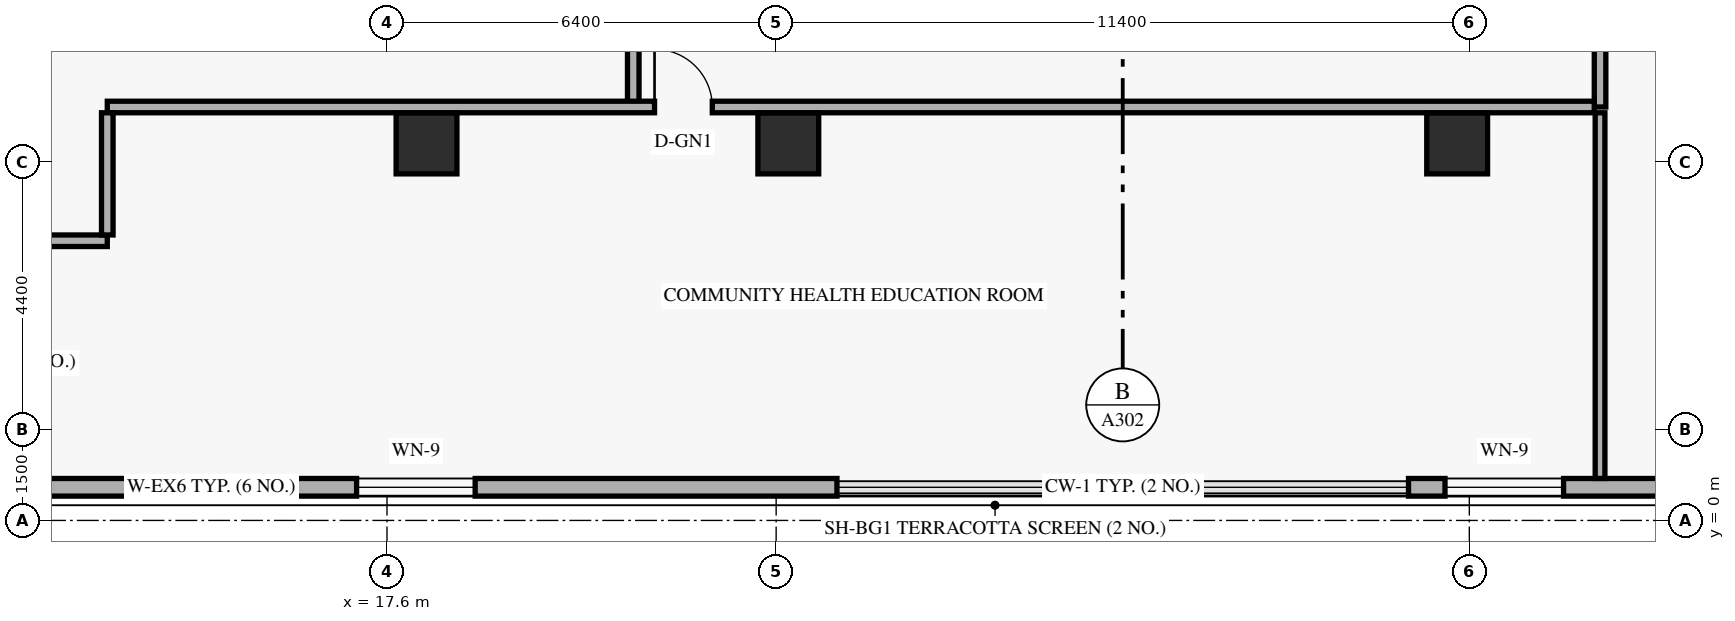
"""IFC4 building model, lengths in metres.
Left out: names, types, materials, properties, quantities, classifications, styles, units other than length and angle.
Written with IfcOpenShell. Run it as: python <this file> out.ifc"""

import sys

from ifc_helpers import new_model, si_unit, direction, frame, frame_2d, origin, origin_2d, place, context, subcontext, project, spatial, rectangle, extrude, element, fill, save


model = new_model("IFC4")
c1 = context("Model", 3, precision=1e-05, world=origin(), true_north=direction((0.0, 1.0)))
c2 = subcontext(c1, "Body", "Model", "MODEL_VIEW")
j1 = project(units=[si_unit("LENGTHUNIT", "METRE"), si_unit("PLANEANGLEUNIT", "RADIAN")], contexts=[c1])
p1 = place(None, origin())
s1 = spatial("IfcSite", under=j1, at=p1, CompositionType="ELEMENT")
p2 = place(p1, origin())
s2 = spatial("IfcBuilding", under=s1, at=p2, CompositionType="ELEMENT")
p3 = place(p2, frame((0.0, 0.0, 4.8)))
s3 = spatial("IfcBuildingStorey", under=s2, at=p3, CompositionType="ELEMENT", Elevation=4.8)
for number, where, z_axis, x_axis in (
    (1, (18.25, 6.2, 0.0), (0.0, 0.0, 1.0), (1.0, 0.0, 0.0)),
    (2, (24.2, 6.2, 0.0), (0.0, 0.0, 1.0), (1.0, 0.0, 0.0)),
    (3, (35.2, 6.2, 0.0), (0.0, 0.0, 1.0), (1.0, 0.0, 0.0)),
):
    element("IfcColumn", number, at=place(p3, frame(where, z_axis=z_axis, x_axis=x_axis)), inside=s3, PredefinedType="COLUMN", context=c2, shape_type="SweptSolid", body=[
        extrude(rectangle(XDim=1.0, YDim=1.0, at=origin_2d()), origin(), (0.0, 0.0, 1.0), 4.8),
    ])
p4 = place(p3, frame((4.42, 0.545, 0.0), z_axis=(0.0, 0.0, 1.0), x_axis=(1.0, 0.0, 0.0)))
e4 = element("IfcWall", 4, at=p4, inside=s3, PredefinedType="SOLIDWALL", context=c2, shape_type="SweptSolid", body=[
    extrude(rectangle(XDim=20.58, YDim=0.29, at=frame_2d((10.29, 0.0))), origin(), (0.0, 0.0, 1.0), 4.52),
])
p5 = place(p4, frame((2.39, 0.0, 0.85)))
e5 = element("IfcOpeningElement", 5, at=p5, cuts=e4, PredefinedType="OPENING", context=c2, shape_type="SweptSolid", body=[
    extrude(rectangle(XDim=1.95, YDim=1.75, at=frame_2d((0.975, 0.875))), frame((0.0, 0.155, 0.0), z_axis=(0.0, -1.0, 0.0), x_axis=(1.0, 0.0, 0.0)), (0.0, 0.0, 1.0), 0.31),
])
p6 = place(p4, frame((12.68, 0.0, 0.85)))
e6 = element("IfcOpeningElement", 6, at=p6, cuts=e4, PredefinedType="OPENING", context=c2, shape_type="SweptSolid", body=[
    extrude(rectangle(XDim=1.95, YDim=1.75, at=frame_2d((0.975, 0.875))), frame((0.0, 0.155, 0.0), z_axis=(0.0, -1.0, 0.0), x_axis=(1.0, 0.0, 0.0)), (0.0, 0.0, 1.0), 0.31),
])
p7 = place(p3, frame((34.4, 0.545, 0.0), z_axis=(0.0, 0.0, 1.0), x_axis=(1.0, 0.0, 0.0)))
e7 = element("IfcWall", 7, at=p7, inside=s3, PredefinedType="SOLIDWALL", context=c2, shape_type="SweptSolid", body=[
    extrude(rectangle(XDim=16.38, YDim=0.29, at=frame_2d((8.19, 0.0))), origin(), (0.0, 0.0, 1.0), 4.52),
])
p8 = place(p7, frame((0.6, 0.0, 0.85)))
e8 = element("IfcOpeningElement", 8, at=p8, cuts=e7, PredefinedType="OPENING", context=c2, shape_type="SweptSolid", body=[
    extrude(rectangle(XDim=1.95, YDim=1.75, at=frame_2d((0.975, 0.875))), frame((0.0, 0.155, 0.0), z_axis=(0.0, -1.0, 0.0), x_axis=(1.0, 0.0, 0.0)), (0.0, 0.0, 1.0), 0.31),
])
p9 = place(p7, frame((8.79, 0.0, 0.85)))
e9 = element("IfcOpeningElement", 9, at=p9, cuts=e7, PredefinedType="OPENING", context=c2, shape_type="SweptSolid", body=[
    extrude(rectangle(XDim=1.95, YDim=1.75, at=frame_2d((0.975, 0.875))), frame((0.0, 0.155, 0.0), z_axis=(0.0, -1.0, 0.0), x_axis=(1.0, 0.0, 0.0)), (0.0, 0.0, 1.0), 0.31),
])
p10 = place(p3, frame((21.65, 6.8, 0.0), z_axis=(0.0, 0.0, 1.0), x_axis=(0.0, 1.0, 0.0)))
e10 = element("IfcWall", 10, at=p10, inside=s3, PredefinedType="STANDARD", context=c2, shape_type="SweptSolid", body=[
    extrude(rectangle(XDim=34.4, YDim=0.19, at=frame_2d((17.2, 0.0))), origin(), (0.0, 0.0, 1.0), 3.502),
])
p11 = place(p10, frame((20.2, 0.0, 0.0)))
e11 = element("IfcOpeningElement", 11, at=p11, cuts=e10, PredefinedType="OPENING", context=c2, shape_type="SweptSolid", body=[
    extrude(rectangle(XDim=0.92, YDim=2.14, at=frame_2d((0.46, 1.07))), frame((0.0, 0.105, 0.0), z_axis=(0.0, -1.0, 0.0), x_axis=(1.0, 0.0, 0.0)), (0.0, 0.0, 1.0), 0.21),
])
p12 = place(p10, frame((28.2, 0.0, 0.0)))
e12 = element("IfcOpeningElement", 12, at=p12, cuts=e10, PredefinedType="OPENING", context=c2, shape_type="SweptSolid", body=[
    extrude(rectangle(XDim=0.95, YDim=2.15, at=frame_2d((0.475, 1.075))), frame((0.0, 0.105, 0.0), z_axis=(0.0, -1.0, 0.0), x_axis=(1.0, 0.0, 0.0)), (0.0, 0.0, 1.0), 0.21),
])
p13 = place(p10, frame((6.0, 0.0, 0.0)))
e13 = element("IfcOpeningElement", 13, at=p13, cuts=e10, PredefinedType="OPENING", context=c2, shape_type="SweptSolid", body=[
    extrude(rectangle(XDim=0.9, YDim=2.1, at=frame_2d((0.45, 1.05))), frame((0.0, 0.105, 0.0), z_axis=(0.0, -1.0, 0.0), x_axis=(1.0, 0.0, 0.0)), (0.0, 0.0, 1.0), 0.21),
])
p14 = place(p3, frame((37.55, 6.8, 0.0), z_axis=(0.0, 0.0, 1.0), x_axis=(0.0, 1.0, 0.0)))
e14 = element("IfcWall", 14, at=p14, inside=s3, PredefinedType="STANDARD", context=c2, shape_type="SweptSolid", body=[
    extrude(rectangle(XDim=34.4, YDim=0.19, at=frame_2d((17.2, 0.0))), origin(), (0.0, 0.0, 1.0), 3.502),
])
p15 = place(p14, frame((3.0, 0.0, 0.0)))
e15 = element("IfcOpeningElement", 15, at=p15, cuts=e14, PredefinedType="OPENING", context=c2, shape_type="SweptSolid", body=[
    extrude(rectangle(XDim=1.05, YDim=2.15, at=frame_2d((0.525, 1.075))), frame((0.0, 0.105, 0.0), z_axis=(0.0, -1.0, 0.0), x_axis=(1.0, 0.0, 0.0)), (0.0, 0.0, 1.0), 0.21),
])
p16 = place(p14, frame((15.2, 0.0, 0.0)))
e16 = element("IfcOpeningElement", 16, at=p16, cuts=e14, PredefinedType="OPENING", context=c2, shape_type="SweptSolid", body=[
    extrude(rectangle(XDim=1.2, YDim=2.15, at=frame_2d((0.6, 1.075))), frame((0.0, 0.105, 0.0), z_axis=(0.0, -1.0, 0.0), x_axis=(1.0, 0.0, 0.0)), (0.0, 0.0, 1.0), 0.21),
])
p17 = place(p14, frame((26.8, 0.0, 0.0)))
e17 = element("IfcOpeningElement", 17, at=p17, cuts=e14, PredefinedType="OPENING", context=c2, shape_type="SweptSolid", body=[
    extrude(rectangle(XDim=1.05, YDim=2.15, at=frame_2d((0.525, 1.075))), frame((0.0, 0.105, 0.0), z_axis=(0.0, -1.0, 0.0), x_axis=(1.0, 0.0, 0.0)), (0.0, 0.0, 1.0), 0.21),
])
p18 = place(p3, frame((13.0, 6.8, 0.0), z_axis=(0.0, 0.0, 1.0), x_axis=(1.0, 0.0, 0.0)))
e18 = element("IfcWall", 18, at=p18, inside=s3, PredefinedType="STANDARD", context=c2, shape_type="SweptSolid", body=[
    extrude(rectangle(XDim=24.455, YDim=0.19, at=frame_2d((12.228, 0.0))), origin(), (0.0, 0.0, 1.0), 3.732),
])
p19 = place(p18, frame((9.0, 0.0, 0.0)))
e19 = element("IfcOpeningElement", 19, at=p19, cuts=e18, PredefinedType="OPENING", context=c2, shape_type="SweptSolid", body=[
    extrude(rectangle(XDim=0.95, YDim=2.15, at=frame_2d((0.475, 1.075))), frame((0.0, 0.105, 0.0), z_axis=(0.0, -1.0, 0.0), x_axis=(1.0, 0.0, 0.0)), (0.0, 0.0, 1.0), 0.21),
])
p20 = place(p3, frame((11.15, 4.6, 0.0), z_axis=(0.0, 0.0, 1.0), x_axis=(1.0, 0.0, 0.0)))
e20 = element("IfcWall", 20, at=p20, inside=s3, PredefinedType="STANDARD", context=c2, shape_type="SweptSolid", body=[
    extrude(rectangle(XDim=1.85, YDim=0.19, at=frame_2d((0.925, 0.0))), origin(), (0.0, 0.0, 1.0), 4.52),
])
p21 = place(p3, frame((13.0, 4.695, 0.0), z_axis=(0.0, 0.0, 1.0), x_axis=(0.0, 1.0, 0.0)))
e21 = element("IfcWall", 21, at=p21, inside=s3, PredefinedType="STANDARD", context=c2, shape_type="SweptSolid", body=[
    extrude(rectangle(XDim=2.01, YDim=0.19, at=frame_2d((1.005, 0.0))), origin(), (0.0, 0.0, 1.0), 3.969),
])
p22 = place(p3, frame((37.55, 0.69, 0.0), z_axis=(0.0, 0.0, 1.0), x_axis=(0.0, 1.0, 0.0)))
e22 = element("IfcWall", 22, at=p22, inside=s3, PredefinedType="PARTITIONING", context=c2, shape_type="SweptSolid", body=[
    extrude(rectangle(XDim=6.015, YDim=0.16, at=frame_2d((3.008, 0.0))), origin(), (0.0, 0.0, 1.0), 3.969),
])
p23 = place(p6, origin())
e23 = element("IfcWindow", 23, at=p23, inside=s3, PartitioningType="SINGLE_PANEL", PredefinedType="WINDOW", context=c2, shape_type="SweptSolid", body=[
    extrude(rectangle(XDim=1.95, YDim=1.75, at=frame_2d((0.975, 0.875))), frame((0.0, 0.03, 0.0), z_axis=(0.0, -1.0, 0.0), x_axis=(1.0, 0.0, 0.0)), (0.0, 0.0, 1.0), 0.06),
])
fill(e6, e23)
p24 = place(p8, origin())
e24 = element("IfcWindow", 24, at=p24, inside=s3, PartitioningType="SINGLE_PANEL", PredefinedType="WINDOW", context=c2, shape_type="SweptSolid", body=[
    extrude(rectangle(XDim=1.95, YDim=1.75, at=frame_2d((0.975, 0.875))), frame((0.0, 0.03, 0.0), z_axis=(0.0, -1.0, 0.0), x_axis=(1.0, 0.0, 0.0)), (0.0, 0.0, 1.0), 0.06),
])
fill(e8, e24)
p25 = place(p19, origin())
e25 = element("IfcDoor", 25, at=p25, inside=s3, OperationType="SINGLE_SWING_LEFT", PredefinedType="DOOR", context=c2, shape_type="SweptSolid", body=[
    extrude(rectangle(XDim=0.95, YDim=2.15, at=frame_2d((0.475, 1.075))), frame((0.0, 0.025, 0.0), z_axis=(0.0, -1.0, 0.0), x_axis=(1.0, 0.0, 0.0)), (0.0, 0.0, 1.0), 0.05),
])
fill(e19, e25)
save(model, sys.argv[1])
